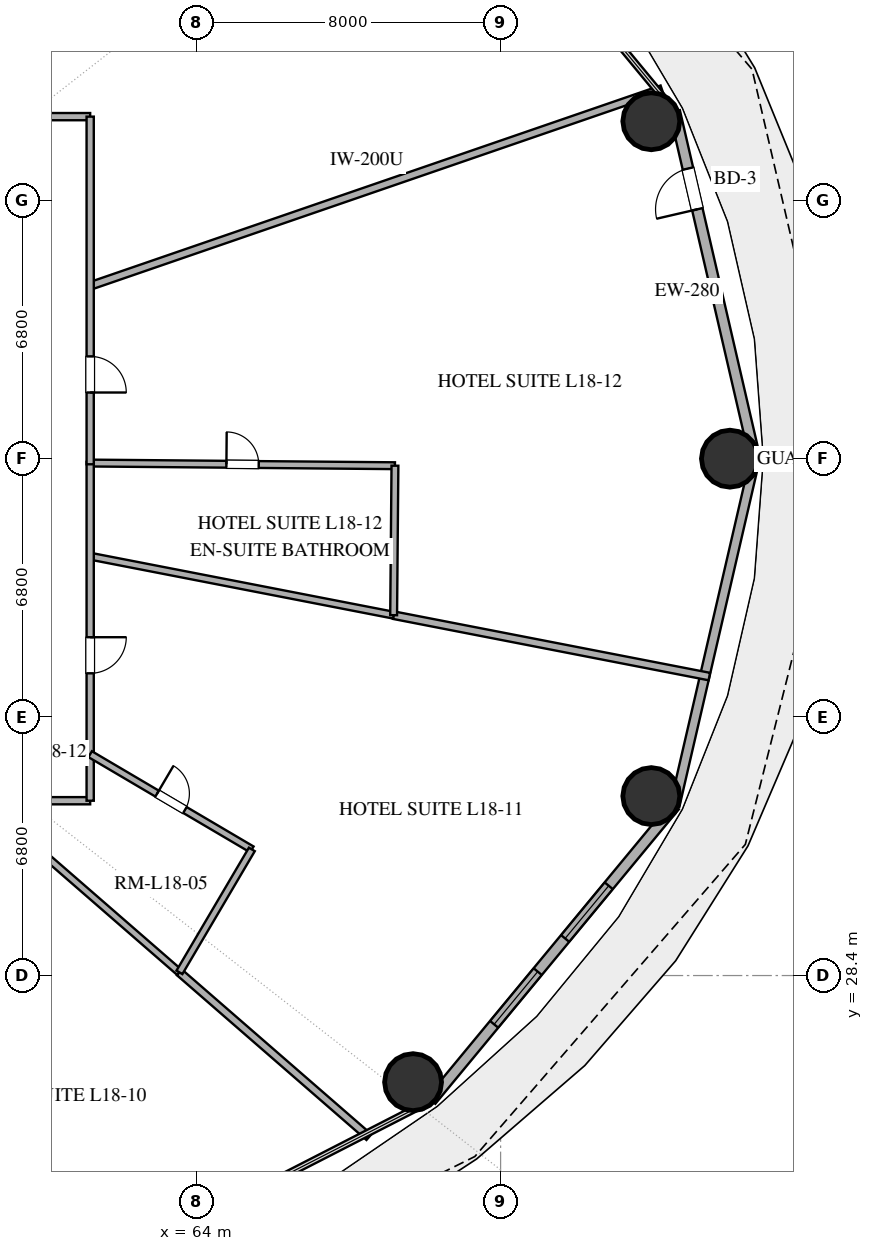
"""IFC4 building model, lengths in metres.
Left out: names, types, materials, properties, quantities, classifications, styles, units other than length and angle.
Written with IfcOpenShell. Run it as: python <this file> out.ifc"""

import sys

from ifc_helpers import new_model, si_unit, direction, frame, frame_2d, origin, origin_2d, place, context, subcontext, project, spatial, rectangle, hollow_circle, extrude, element, fill, save


model = new_model("IFC4")
c1 = context("Model", 3, precision=1e-05, world=origin(), true_north=direction((0.0, 1.0)))
c2 = subcontext(c1, "Body", "Model", "MODEL_VIEW")
j1 = project(units=[si_unit("LENGTHUNIT", "METRE"), si_unit("PLANEANGLEUNIT", "RADIAN")], contexts=[c1])
p1 = place(None, origin())
s1 = spatial("IfcSite", under=j1, at=p1, CompositionType="ELEMENT")
p2 = place(p1, origin())
s2 = spatial("IfcBuilding", under=s1, at=p2, CompositionType="ELEMENT")
p3 = place(p2, frame((0.0, 0.0, 75.0)))
s3 = spatial("IfcBuildingStorey", under=s2, at=p3, CompositionType="ELEMENT", Elevation=75.0)
for number, where, z_axis, x_axis in (
    (1, (78.035, 42.0, 0.0), (0.0, 0.0, 1.0), (1.0, 0.0, 0.0)),
    (2, (75.966, 50.878, 0.0), (0.0, 0.0, 1.0), (1.0, 0.0, 0.0)),
    (3, (69.697, 25.595, 0.0), (0.0, 0.0, 1.0), (1.0, 0.0, 0.0)),
    (4, (75.966, 33.122, 0.0), (0.0, 0.0, 1.0), (1.0, 0.0, 0.0)),
):
    element("IfcColumn", number, at=place(p3, frame(where, z_axis=z_axis, x_axis=x_axis)), inside=s3, PredefinedType="COLUMN", context=c2, shape_type="SweptSolid", body=[
        extrude(hollow_circle(Radius=0.75, WallThickness=0.04, at=origin_2d()), origin(), (0.0, 0.0, 1.0), 3.25),
    ])
p4 = place(p3, frame((78.696, 42.0, 0.0), z_axis=(0.0, 0.0, 1.0), x_axis=(-0.225454452941, 0.974253709076, 0.0)))
e5 = element("IfcWall", 5, at=p4, inside=s3, PredefinedType="SOLIDWALL", context=c2, shape_type="SweptSolid", body=[
    extrude(rectangle(XDim=9.38, YDim=0.28, at=frame_2d((4.69, 0.0))), origin(), (0.0, 0.0, 1.0), 3.25),
])
p5 = place(p4, frame((6.735, 0.0, 0.0)))
e6 = element("IfcOpeningElement", 6, at=p5, cuts=e5, PredefinedType="OPENING", context=c2, shape_type="SweptSolid", body=[
    extrude(rectangle(XDim=1.1, YDim=2.25, at=frame_2d((0.55, 1.125))), frame((0.0, 0.15, 0.0), z_axis=(0.0, -1.0, 0.0), x_axis=(1.0, 0.0, 0.0)), (0.0, 0.0, 1.0), 0.3),
])
p6 = place(p3, frame((70.174, 25.114, 0.0), z_axis=(0.0, 0.0, 1.0), x_axis=(0.637296809613, 0.770618437657, 0.0)))
e7 = element("IfcWall", 7, at=p6, inside=s3, PredefinedType="SOLIDWALL", context=c2, shape_type="SweptSolid", body=[
    extrude(rectangle(XDim=10.053, YDim=0.28, at=frame_2d((5.027, 0.0))), origin(), (0.0, 0.0, 1.0), 3.25),
])
p7 = place(p6, frame((2.598, 0.0, 0.85)))
e8 = element("IfcOpeningElement", 8, at=p7, cuts=e7, PredefinedType="OPENING", context=c2, shape_type="SweptSolid", body=[
    extrude(rectangle(XDim=1.8, YDim=2.2, at=frame_2d((0.9, 1.1))), frame((0.0, 0.15, 0.0), z_axis=(0.0, -1.0, 0.0), x_axis=(1.0, 0.0, 0.0)), (0.0, 0.0, 1.0), 0.3),
])
p8 = place(p6, frame((5.53, 0.0, 0.85)))
e9 = element("IfcOpeningElement", 9, at=p8, cuts=e7, PredefinedType="OPENING", context=c2, shape_type="SweptSolid", body=[
    extrude(rectangle(XDim=1.8, YDim=2.2, at=frame_2d((0.9, 1.1))), frame((0.0, 0.15, 0.0), z_axis=(0.0, -1.0, 0.0), x_axis=(1.0, 0.0, 0.0)), (0.0, 0.0, 1.0), 0.3),
])
p9 = place(p3, frame((76.581, 32.862, 0.0), z_axis=(0.0, 0.0, 1.0), x_axis=(0.225454452941, 0.974253709076, 0.0)))
e10 = element("IfcWall", 10, at=p9, inside=s3, PredefinedType="SOLIDWALL", context=c2, shape_type="SweptSolid", body=[
    extrude(rectangle(XDim=9.38, YDim=0.25, at=frame_2d((4.69, 0.0))), origin(), (0.0, 0.0, 1.0), 3.25),
])
p10 = place(p3, frame((61.2, 46.545, 0.0), z_axis=(0.0, 0.0, 1.0), x_axis=(0.945518845989, 0.325567369186, 0.0)))
e11 = element("IfcWall", 11, at=p10, inside=s3, PredefinedType="PARTITIONING", context=c2, shape_type="SweptSolid", body=[
    extrude(rectangle(XDim=15.909, YDim=0.2, at=frame_2d((7.955, 0.0))), origin(), (0.0, 0.0, 1.0), 2.61),
])
p11 = place(p3, frame((77.492, 36.267, 0.0), z_axis=(0.0, 0.0, 1.0), x_axis=(-0.981626048747, 0.190814832812, 0.0)))
e12 = element("IfcWall", 12, at=p11, inside=s3, PredefinedType="PARTITIONING", context=c2, shape_type="SweptSolid", body=[
    extrude(rectangle(XDim=8.462, YDim=0.2, at=frame_2d((4.231, 0.0))), origin(), (0.0, 0.0, 1.0), 2.61),
])
p12 = place(p3, frame((55.823, 51.0, 0.0), z_axis=(0.0, 0.0, 1.0), x_axis=(0.656066321773, 0.754703240641, 0.0)))
e13 = element("IfcWall", 13, at=p12, inside=s3, PredefinedType="PARTITIONING", context=c2, shape_type="SweptSolid", body=[
    extrude(rectangle(XDim=14.091, YDim=0.2, at=frame_2d((7.045, 0.0))), origin(), (0.0, 0.0, 1.0), 2.61),
])
p13 = place(p3, frame((69.185, 37.882, 0.0), z_axis=(0.0, 0.0, 1.0), x_axis=(-0.981631630513, 0.190786115787, 0.0)))
e14 = element("IfcWall", 14, at=p13, inside=s3, PredefinedType="PLUMBINGWALL", context=c2, shape_type="SweptSolid", body=[
    extrude(rectangle(XDim=8.135, YDim=0.18, at=frame_2d((4.067, 0.0))), origin(), (0.0, 0.0, 1.0), 2.61),
])
p14 = place(p3, frame((61.2, 41.885, 0.0), z_axis=(0.0, 0.0, 1.0), x_axis=(0.999961832732, -0.008736880358, 0.0)))
e15 = element("IfcWall", 15, at=p14, inside=s3, PredefinedType="PLUMBINGWALL", context=c2, shape_type="SweptSolid", body=[
    extrude(rectangle(XDim=8.02, YDim=0.18, at=frame_2d((4.01, 0.0))), origin(), (0.0, 0.0, 1.0), 2.61),
])
p15 = place(p14, frame((3.585, 0.0, 0.0)))
e16 = element("IfcOpeningElement", 16, at=p15, cuts=e15, PredefinedType="OPENING", context=c2, shape_type="SweptSolid", body=[
    extrude(rectangle(XDim=0.85, YDim=2.1, at=frame_2d((0.425, 1.05))), frame((0.0, 0.1, 0.0), z_axis=(0.0, -1.0, 0.0), x_axis=(1.0, 0.0, 0.0)), (0.0, 0.0, 1.0), 0.2),
])
p16 = place(p3, frame((63.549, 28.484, 0.0), z_axis=(0.0, 0.0, 1.0), x_axis=(-0.754699426586, 0.65607070923, 0.0)))
e17 = element("IfcWall", 17, at=p16, inside=s3, PredefinedType="PLUMBINGWALL", context=c2, shape_type="SweptSolid", body=[
    extrude(rectangle(XDim=6.884, YDim=0.18, at=frame_2d((3.442, 0.0))), origin(), (0.0, 0.0, 1.0), 2.61),
])
p17 = place(p3, frame((68.535, 24.149, 0.0), z_axis=(0.0, 0.0, 1.0), x_axis=(-0.754728806145, 0.656036911442, 0.0)))
e18 = element("IfcWall", 18, at=p17, inside=s3, PredefinedType="PARTITIONING", context=c2, shape_type="SweptSolid", body=[
    extrude(rectangle(XDim=6.607, YDim=0.2, at=frame_2d((3.304, 0.0))), origin(), (0.0, 0.0, 1.0), 2.61),
])
p18 = place(p3, frame((53.264, 51.0, 0.0), z_axis=(0.0, 0.0, 1.0), x_axis=(1.0, 0.0, 0.0)))
e19 = element("IfcWall", 19, at=p18, inside=s3, PredefinedType="PARTITIONING", context=c2, shape_type="SweptSolid", body=[
    extrude(rectangle(XDim=7.936, YDim=0.19, at=frame_2d((3.968, 0.0))), origin(), (0.0, 0.0, 1.0), 2.61),
])
p19 = place(p18, frame((4.726, 0.0, 0.0)))
e20 = element("IfcOpeningElement", 20, at=p19, cuts=e19, PredefinedType="OPENING", context=c2, shape_type="SweptSolid", body=[
    extrude(rectangle(XDim=1.0, YDim=2.2, at=frame_2d((0.5, 1.1))), frame((0.0, 0.105, 0.0), z_axis=(0.0, -1.0, 0.0), x_axis=(1.0, 0.0, 0.0)), (0.0, 0.0, 1.0), 0.21),
])
p20 = place(p3, frame((61.2, 33.0, 0.0), z_axis=(0.0, 0.0, 1.0), x_axis=(-1.0, 0.0, 0.0)))
e21 = element("IfcWall", 21, at=p20, inside=s3, PredefinedType="PARTITIONING", context=c2, shape_type="SweptSolid", body=[
    extrude(rectangle(XDim=10.135, YDim=0.19, at=frame_2d((5.067, 0.0))), origin(), (0.0, 0.0, 1.0), 2.61),
])
p21 = place(p20, frame((4.996, 0.0, 0.0)))
e22 = element("IfcOpeningElement", 22, at=p21, cuts=e21, PredefinedType="OPENING", context=c2, shape_type="SweptSolid", body=[
    extrude(rectangle(XDim=0.95, YDim=2.15, at=frame_2d((0.475, 1.075))), frame((0.0, 0.105, 0.0), z_axis=(0.0, -1.0, 0.0), x_axis=(1.0, 0.0, 0.0)), (0.0, 0.0, 1.0), 0.21),
])
p22 = place(p3, frame((61.2, 41.917, 0.0), z_axis=(0.0, 0.0, 1.0), x_axis=(0.0, -1.0, 0.0)))
e23 = element("IfcWall", 23, at=p22, inside=s3, PredefinedType="PARTITIONING", context=c2, shape_type="SweptSolid", body=[
    extrude(rectangle(XDim=8.917, YDim=0.19, at=frame_2d((4.458, 0.0))), origin(), (0.0, 0.0, 1.0), 2.61),
])
p23 = place(p22, frame((4.615, 0.0, 0.0)))
e24 = element("IfcOpeningElement", 24, at=p23, cuts=e23, PredefinedType="OPENING", context=c2, shape_type="SweptSolid", body=[
    extrude(rectangle(XDim=0.95, YDim=2.15, at=frame_2d((0.475, 1.075))), frame((0.0, 0.105, 0.0), z_axis=(0.0, -1.0, 0.0), x_axis=(1.0, 0.0, 0.0)), (0.0, 0.0, 1.0), 0.21),
])
p24 = place(p3, frame((61.2, 34.225, 0.0), z_axis=(0.0, 0.0, 1.0), x_axis=(0.861622640197, -0.507549431977, 0.0)))
e25 = element("IfcWall", 25, at=p24, inside=s3, PredefinedType="PLUMBINGWALL", context=c2, shape_type="SweptSolid", body=[
    extrude(rectangle(XDim=4.938, YDim=0.18, at=frame_2d((2.469, 0.0))), origin(), (0.0, 0.0, 1.0), 2.61),
])
p25 = place(p24, frame((2.044, 0.0, 0.0)))
e26 = element("IfcOpeningElement", 26, at=p25, cuts=e25, PredefinedType="OPENING", context=c2, shape_type="SweptSolid", body=[
    extrude(rectangle(XDim=0.85, YDim=2.1, at=frame_2d((0.425, 1.05))), frame((0.0, 0.1, 0.0), z_axis=(0.0, -1.0, 0.0), x_axis=(1.0, 0.0, 0.0)), (0.0, 0.0, 1.0), 0.2),
])
p26 = place(p3, frame((61.2, 51.0, 0.0), z_axis=(0.0, 0.0, 1.0), x_axis=(0.0, -1.0, 0.0)))
e27 = element("IfcWall", 27, at=p26, inside=s3, PredefinedType="PARTITIONING", context=c2, shape_type="SweptSolid", body=[
    extrude(rectangle(XDim=9.147, YDim=0.19, at=frame_2d((4.574, 0.0))), origin(), (0.0, 0.0, 1.0), 2.61),
])
p27 = place(p26, frame((6.309, 0.0, 0.0)))
e28 = element("IfcOpeningElement", 28, at=p27, cuts=e27, PredefinedType="OPENING", context=c2, shape_type="SweptSolid", body=[
    extrude(rectangle(XDim=0.95, YDim=2.15, at=frame_2d((0.475, 1.075))), frame((0.0, 0.105, 0.0), z_axis=(0.0, -1.0, 0.0), x_axis=(1.0, 0.0, 0.0)), (0.0, 0.0, 1.0), 0.21),
])
p28 = place(p3, frame((69.219, 41.815, 0.0), z_axis=(0.0, 0.0, 1.0), x_axis=(-0.008691005249, -0.999962232501, 0.0)))
e29 = element("IfcWall", 29, at=p28, inside=s3, PredefinedType="PLUMBINGWALL", context=c2, shape_type="SweptSolid", body=[
    extrude(rectangle(XDim=3.933, YDim=0.18, at=frame_2d((1.966, 0.0))), origin(), (0.0, 0.0, 1.0), 2.61),
])
p29 = place(p3, frame((65.454, 31.719, 0.0), z_axis=(0.0, 0.0, 1.0), x_axis=(-0.507594049508, -0.861596356134, 0.0)))
e30 = element("IfcWall", 30, at=p29, inside=s3, PredefinedType="PLUMBINGWALL", context=c2, shape_type="SweptSolid", body=[
    extrude(rectangle(XDim=3.754, YDim=0.18, at=frame_2d((1.877, 0.0))), origin(), (0.0, 0.0, 1.0), 2.61),
])
p30 = place(p5, origin())
e31 = element("IfcDoor", 31, at=p30, inside=s3, OperationType="SINGLE_SWING_LEFT", PredefinedType="DOOR", context=c2, shape_type="SweptSolid", body=[
    extrude(rectangle(XDim=1.1, YDim=2.25, at=frame_2d((0.55, 1.125))), frame((0.0, 0.025, 0.0), z_axis=(0.0, -1.0, 0.0), x_axis=(1.0, 0.0, 0.0)), (0.0, 0.0, 1.0), 0.05),
])
fill(e6, e31)
p31 = place(p7, origin())
e32 = element("IfcWindow", 32, at=p31, inside=s3, PartitioningType="SINGLE_PANEL", PredefinedType="WINDOW", context=c2, shape_type="SweptSolid", body=[
    extrude(rectangle(XDim=1.8, YDim=2.2, at=frame_2d((0.9, 1.1))), frame((0.0, 0.03, 0.0), z_axis=(0.0, -1.0, 0.0), x_axis=(1.0, 0.0, 0.0)), (0.0, 0.0, 1.0), 0.06),
])
fill(e8, e32)
p32 = place(p8, origin())
e33 = element("IfcWindow", 33, at=p32, inside=s3, PartitioningType="SINGLE_PANEL", PredefinedType="WINDOW", context=c2, shape_type="SweptSolid", body=[
    extrude(rectangle(XDim=1.8, YDim=2.2, at=frame_2d((0.9, 1.1))), frame((0.0, 0.03, 0.0), z_axis=(0.0, -1.0, 0.0), x_axis=(1.0, 0.0, 0.0)), (0.0, 0.0, 1.0), 0.06),
])
fill(e9, e33)
p33 = place(p15, origin())
e34 = element("IfcDoor", 34, at=p33, inside=s3, OperationType="SINGLE_SWING_LEFT", PredefinedType="DOOR", context=c2, shape_type="SweptSolid", body=[
    extrude(rectangle(XDim=0.85, YDim=2.1, at=frame_2d((0.425, 1.05))), frame((0.0, 0.025, 0.0), z_axis=(0.0, -1.0, 0.0), x_axis=(1.0, 0.0, 0.0)), (0.0, 0.0, 1.0), 0.05),
])
fill(e16, e34)
p34 = place(p23, origin())
e35 = element("IfcDoor", 35, at=p34, inside=s3, OperationType="SINGLE_SWING_LEFT", PredefinedType="DOOR", context=c2, shape_type="SweptSolid", body=[
    extrude(rectangle(XDim=0.95, YDim=2.15, at=frame_2d((0.475, 1.075))), frame((0.0, 0.025, 0.0), z_axis=(0.0, -1.0, 0.0), x_axis=(1.0, 0.0, 0.0)), (0.0, 0.0, 1.0), 0.05),
])
fill(e24, e35)
p35 = place(p25, origin())
e36 = element("IfcDoor", 36, at=p35, inside=s3, OperationType="SINGLE_SWING_LEFT", PredefinedType="DOOR", context=c2, shape_type="SweptSolid", body=[
    extrude(rectangle(XDim=0.85, YDim=2.1, at=frame_2d((0.425, 1.05))), frame((0.0, 0.025, 0.0), z_axis=(0.0, -1.0, 0.0), x_axis=(1.0, 0.0, 0.0)), (0.0, 0.0, 1.0), 0.05),
])
fill(e26, e36)
p36 = place(p27, origin())
e37 = element("IfcDoor", 37, at=p36, inside=s3, OperationType="SINGLE_SWING_RIGHT", PredefinedType="DOOR", context=c2, shape_type="SweptSolid", body=[
    extrude(rectangle(XDim=0.95, YDim=2.15, at=frame_2d((0.475, 1.075))), frame((0.0, 0.025, 0.0), z_axis=(0.0, -1.0, 0.0), x_axis=(1.0, 0.0, 0.0)), (0.0, 0.0, 1.0), 0.05),
])
fill(e28, e37)
save(model, sys.argv[1])
